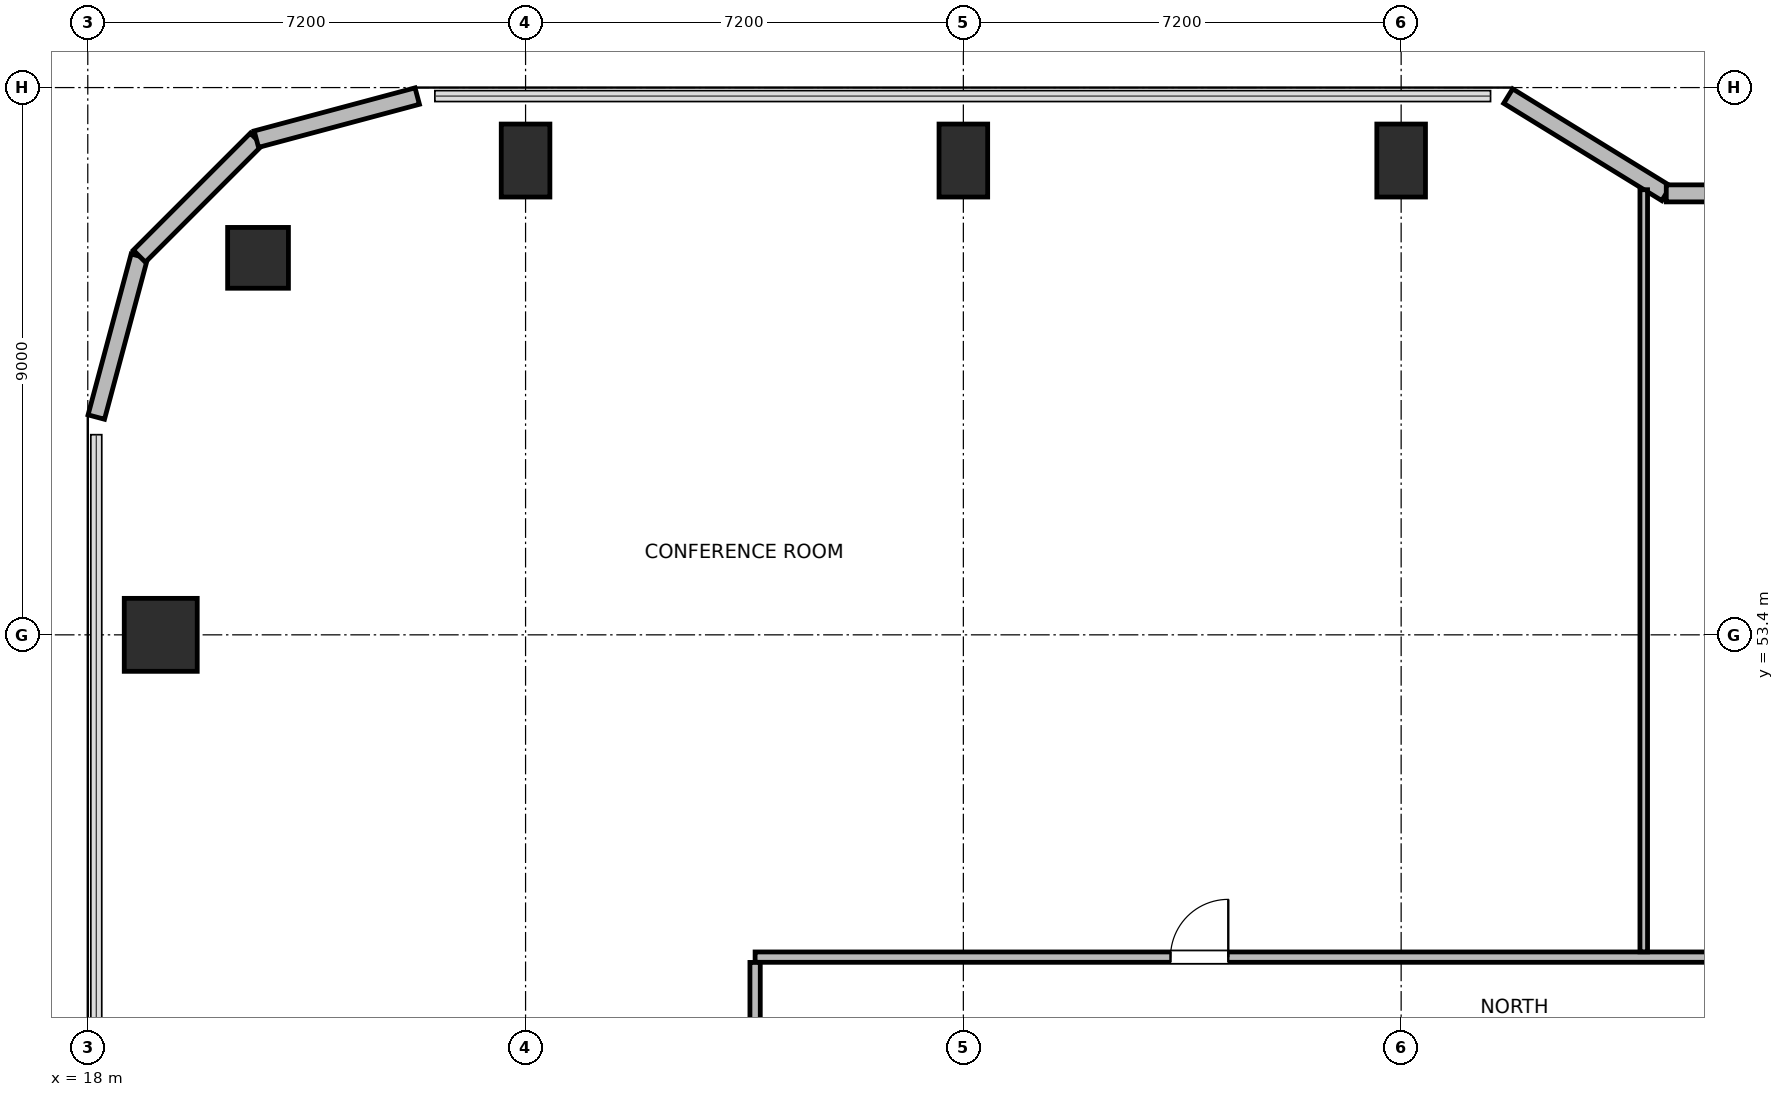
"""IFC4 building model, lengths in metres.
Left out: names, types, materials, properties, quantities, classifications, styles, units other than length and angle.
Written with IfcOpenShell. Run it as: python <this file> out.ifc"""

import sys

from ifc_helpers import new_model, si_unit, direction, frame, frame_2d, origin, origin_2d, place, context, subcontext, project, spatial, rectangle, circle, extrude, element, fill, save


model = new_model("IFC4")
c1 = context("Model", 3, precision=1e-05, world=origin(), true_north=direction((0.0, 1.0)))
c2 = subcontext(c1, "Body", "Model", "MODEL_VIEW")
j1 = project(units=[si_unit("LENGTHUNIT", "METRE"), si_unit("PLANEANGLEUNIT", "RADIAN")], contexts=[c1])
p1 = place(None, origin())
s1 = spatial("IfcSite", under=j1, at=p1, CompositionType="ELEMENT")
p2 = place(p1, origin())
s2 = spatial("IfcBuilding", under=s1, at=p2, CompositionType="ELEMENT")
p3 = place(p2, frame((0.0, 0.0, 201.9)))
s3 = spatial("IfcBuildingStorey", under=s2, at=p3, CompositionType="ELEMENT", Elevation=201.9)
p4 = place(p3, frame((20.8, 59.6, 0.0), z_axis=(0.0, 0.0, 1.0), x_axis=(1.0, 0.0, 0.0)))
e1 = element("IfcColumn", 1, at=p4, inside=s3, PredefinedType="COLUMN", context=c2, shape_type="SweptSolid", body=[
    extrude(circle(Radius=0.5, at=origin_2d()), origin(), (0.0, 0.0, 1.0), 3.9),
])
for number, where, z_axis, x_axis in (
    (2, (25.2, 61.2, 0.0), (0.0, 0.0, 1.0), (1.0, 0.0, 0.0)),
    (3, (32.4, 61.2, 0.0), (0.0, 0.0, 1.0), (1.0, 0.0, 0.0)),
    (4, (39.6, 61.2, 0.0), (0.0, 0.0, 1.0), (1.0, 0.0, 0.0)),
):
    element("IfcColumn", number, at=place(p3, frame(where, z_axis=z_axis, x_axis=x_axis)), inside=s3, PredefinedType="COLUMN", context=c2, shape_type="SweptSolid", body=[
        extrude(rectangle(XDim=0.8, YDim=1.2, at=origin_2d()), origin(), (0.0, 0.0, 1.0), 3.9),
    ])
p5 = place(p3, frame((19.2, 53.4, 0.0), z_axis=(0.0, 0.0, 1.0), x_axis=(1.0, 0.0, 0.0)))
e5 = element("IfcColumn", 5, at=p5, inside=s3, PredefinedType="COLUMN", context=c2, shape_type="SweptSolid", body=[
    extrude(rectangle(XDim=1.2, YDim=1.2, at=origin_2d()), origin(), (0.0, 0.0, 1.0), 3.9),
])
p6 = place(p3, frame((18.14, 56.982, 0.0), z_axis=(0.0, 0.0, 1.0), x_axis=(0.258672222976, 0.9659651552, 0.0)))
e6 = element("IfcWall", 6, at=p6, inside=s3, PredefinedType="SOLIDWALL", context=c2, shape_type="SweptSolid", body=[
    extrude(rectangle(XDim=2.739, YDim=0.28, at=frame_2d((1.37, 0.0))), origin(), (0.0, 0.0, 1.0), 3.68),
])
p7 = place(p3, frame((18.848, 59.627, 0.0), z_axis=(0.0, 0.0, 1.0), x_axis=(0.707106781187, 0.707106781187, 0.0)))
e7 = element("IfcWall", 7, at=p7, inside=s3, PredefinedType="SOLIDWALL", context=c2, shape_type="SweptSolid", body=[
    extrude(rectangle(XDim=2.721, YDim=0.28, at=frame_2d((1.36, 0.0))), origin(), (0.0, 0.0, 1.0), 3.68),
])
p8 = place(p3, frame((20.772, 61.552, 0.0), z_axis=(0.0, 0.0, 1.0), x_axis=(0.965971118627, 0.258649952598, 0.0)))
e8 = element("IfcWall", 8, at=p8, inside=s3, PredefinedType="SOLIDWALL", context=c2, shape_type="SweptSolid", body=[
    extrude(rectangle(XDim=2.739, YDim=0.28, at=frame_2d((1.37, 0.0))), origin(), (0.0, 0.0, 1.0), 3.68),
])
p9 = place(p3, frame((41.36, 62.26, 0.0), z_axis=(0.0, 0.0, 1.0), x_axis=(0.851652825334, -0.524106349037, 0.0)))
e9 = element("IfcWall", 9, at=p9, inside=s3, PredefinedType="SOLIDWALL", context=c2, shape_type="SweptSolid", body=[
    extrude(rectangle(XDim=3.053, YDim=0.28, at=frame_2d((1.526, 0.0))), origin(), (0.0, 0.0, 1.0), 2.265),
])
p10 = place(p3, frame((43.96, 60.66, 0.0), z_axis=(0.0, 0.0, 1.0), x_axis=(1.0, 0.0, 0.0)))
e10 = element("IfcWall", 10, at=p10, inside=s3, PredefinedType="SOLIDWALL", context=c2, shape_type="SweptSolid", body=[
    extrude(rectangle(XDim=4.699, YDim=0.28, at=frame_2d((2.35, 0.0))), origin(), (0.0, 0.0, 1.0), 2.265),
])
p11 = place(p10, frame((1.75, 0.0, 0.85)))
e11 = element("IfcOpeningElement", 11, at=p11, cuts=e10, PredefinedType="OPENING", context=c2, shape_type="SweptSolid", body=[
    extrude(rectangle(XDim=1.2, YDim=1.1, at=frame_2d((0.6, 0.55))), frame((0.0, 0.15, 0.0), z_axis=(0.0, -1.0, 0.0), x_axis=(1.0, 0.0, 0.0)), (0.0, 0.0, 1.0), 0.3),
])
p12 = place(p3, frame((28.975, 48.1, 0.0), z_axis=(0.0, 0.0, 1.0), x_axis=(1.0, 0.0, 0.0)))
e12 = element("IfcWall", 12, at=p12, inside=s3, PredefinedType="PARTITIONING", context=c2, shape_type="SweptSolid", body=[
    extrude(rectangle(XDim=34.625, YDim=0.17, at=frame_2d((17.312, 0.0))), origin(), (0.0, 0.0, 1.0), 3.68),
])
p13 = place(p12, frame((6.832, 0.0, 0.0)))
e13 = element("IfcOpeningElement", 13, at=p13, cuts=e12, PredefinedType="OPENING", context=c2, shape_type="SweptSolid", body=[
    extrude(rectangle(XDim=0.95, YDim=2.04, at=frame_2d((0.475, 1.02))), frame((0.0, 0.095, 0.0), z_axis=(0.0, -1.0, 0.0), x_axis=(1.0, 0.0, 0.0)), (0.0, 0.0, 1.0), 0.19),
])
p14 = place(p12, frame((17.245, 0.0, 0.0)))
e14 = element("IfcOpeningElement", 14, at=p14, cuts=e12, PredefinedType="OPENING", context=c2, shape_type="SweptSolid", body=[
    extrude(rectangle(XDim=0.95, YDim=2.04, at=frame_2d((0.475, 1.02))), frame((0.0, 0.095, 0.0), z_axis=(0.0, -1.0, 0.0), x_axis=(1.0, 0.0, 0.0)), (0.0, 0.0, 1.0), 0.19),
])
p15 = place(p12, frame((21.475, 0.0, 0.0)))
e15 = element("IfcOpeningElement", 15, at=p15, cuts=e12, PredefinedType="OPENING", context=c2, shape_type="SweptSolid", body=[
    extrude(rectangle(XDim=0.95, YDim=2.04, at=frame_2d((0.475, 1.02))), frame((0.0, 0.095, 0.0), z_axis=(0.0, -1.0, 0.0), x_axis=(1.0, 0.0, 0.0)), (0.0, 0.0, 1.0), 0.19),
])
p16 = place(p12, frame((28.375, 0.0, 0.0)))
e16 = element("IfcOpeningElement", 16, at=p16, cuts=e12, PredefinedType="OPENING", context=c2, shape_type="SweptSolid", body=[
    extrude(rectangle(XDim=0.95, YDim=2.04, at=frame_2d((0.475, 1.02))), frame((0.0, 0.095, 0.0), z_axis=(0.0, -1.0, 0.0), x_axis=(1.0, 0.0, 0.0)), (0.0, 0.0, 1.0), 0.19),
])
p17 = place(p3, frame((28.975, 37.1, 0.0), z_axis=(0.0, 0.0, 1.0), x_axis=(0.0, 1.0, 0.0)))
e17 = element("IfcWall", 17, at=p17, inside=s3, PredefinedType="PARTITIONING", context=c2, shape_type="SweptSolid", body=[
    extrude(rectangle(XDim=10.913, YDim=0.17, at=frame_2d((5.457, 0.0))), origin(), (0.0, 0.0, 1.0), 3.68),
])
p18 = place(p17, frame((5.025, 0.0, 0.0)))
e18 = element("IfcOpeningElement", 18, at=p18, cuts=e17, PredefinedType="OPENING", context=c2, shape_type="SweptSolid", body=[
    extrude(rectangle(XDim=0.95, YDim=2.04, at=frame_2d((0.475, 1.02))), frame((0.0, 0.095, 0.0), z_axis=(0.0, -1.0, 0.0), x_axis=(1.0, 0.0, 0.0)), (0.0, 0.0, 1.0), 0.19),
])
p19 = place(p3, frame((43.59, 48.187, 0.0), z_axis=(0.0, 0.0, 1.0), x_axis=(0.0, 1.0, 0.0)))
e19 = element("IfcWall", 19, at=p19, inside=s3, PredefinedType="PARTITIONING", context=c2, shape_type="SweptSolid", body=[
    extrude(rectangle(XDim=12.533, YDim=0.125, at=frame_2d((6.267, 0.0))), origin(), (0.0, 0.0, 1.0), 3.043),
])
p20 = place(p13, origin())
e20 = element("IfcDoor", 20, at=p20, inside=s3, OperationType="SINGLE_SWING_RIGHT", PredefinedType="DOOR", context=c2, shape_type="SweptSolid", body=[
    extrude(rectangle(XDim=0.95, YDim=2.04, at=frame_2d((0.475, 1.02))), frame((0.0, 0.025, 0.0), z_axis=(0.0, -1.0, 0.0), x_axis=(1.0, 0.0, 0.0)), (0.0, 0.0, 1.0), 0.05),
])
fill(e13, e20)
save(model, sys.argv[1])
